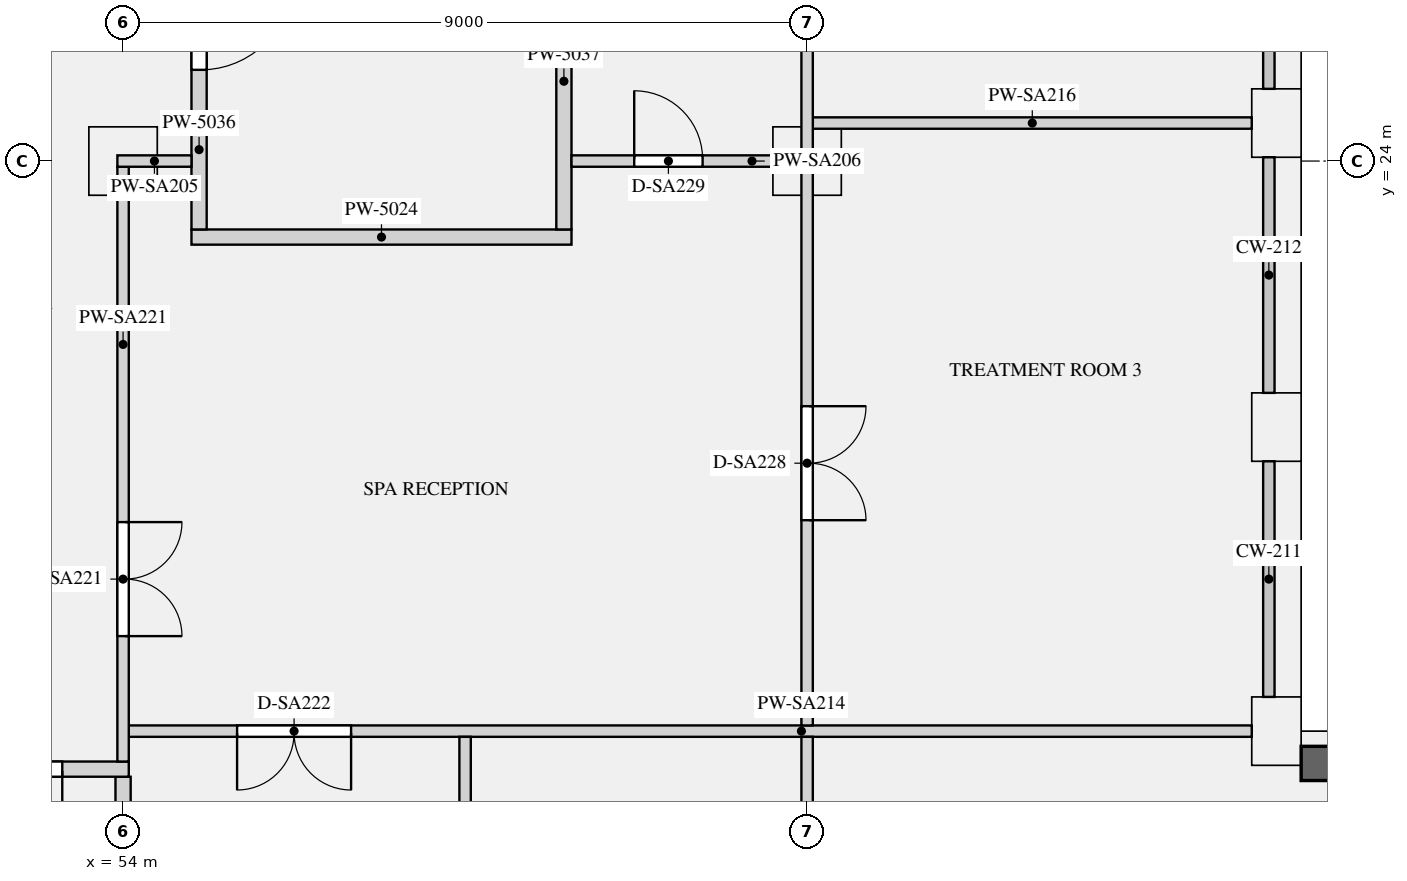
"""IFC4 building model, lengths in metres.
Left out: names, types, materials, properties, quantities, classifications, styles, units other than length and angle.
Written with IfcOpenShell. Run it as: python <this file> out.ifc"""

import sys

from ifc_helpers import new_model, si_unit, direction, frame, frame_2d, origin, origin_2d, place, context, subcontext, project, spatial, rectangle, extrude, element, fill, save


model = new_model("IFC4")
c1 = context("Model", 3, precision=1e-05, world=origin(), true_north=direction((0.0, 1.0)))
c2 = subcontext(c1, "Body", "Model", "MODEL_VIEW")
j1 = project(units=[si_unit("LENGTHUNIT", "METRE"), si_unit("PLANEANGLEUNIT", "RADIAN")], contexts=[c1])
p1 = place(None, origin())
s1 = spatial("IfcSite", under=j1, at=p1, CompositionType="ELEMENT")
p2 = place(p1, origin())
s2 = spatial("IfcBuilding", under=s1, at=p2, CompositionType="ELEMENT")
p3 = place(p2, frame((0.0, 0.0, 191.7)))
s3 = spatial("IfcBuildingStorey", under=s2, at=p3, CompositionType="ELEMENT", Elevation=191.7)
for number, where, z_axis, x_axis in (
    (1, (69.175, 16.5, 0.0), (0.0, 0.0, 1.0), (0.0, 1.0, 0.0)),
    (2, (69.175, 20.5, 0.0), (0.0, 0.0, 1.0), (0.0, 1.0, 0.0)),
    (3, (69.175, 24.5, 0.0), (0.0, 0.0, 1.0), (0.0, 1.0, 0.0)),
):
    element("IfcColumn", number, at=place(p3, frame(where, z_axis=z_axis, x_axis=x_axis)), inside=s3, PredefinedType="USERDEFINED", context=c2, shape_type="SweptSolid", body=[
        extrude(rectangle(XDim=0.9, YDim=0.65, at=origin_2d()), origin(), (0.0, 0.0, 1.0), 6.3),
    ])
for number, where, z_axis, x_axis in (
    (4, (54.0, 24.0, 0.0), (0.0, 0.0, 1.0), (1.0, 0.0, 0.0)),
    (5, (63.0, 24.0, 0.0), (0.0, 0.0, 1.0), (1.0, 0.0, 0.0)),
):
    element("IfcColumn", number, at=place(p3, frame(where, z_axis=z_axis, x_axis=x_axis)), inside=s3, PredefinedType="COLUMN", context=c2, shape_type="SweptSolid", body=[
        extrude(rectangle(XDim=0.9, YDim=0.9, at=origin_2d()), origin(), (0.0, 0.0, 1.0), 6.3),
    ])
p4 = place(p3, frame((71.1, 16.075, 0.9), z_axis=(0.0, 0.0, 1.0), x_axis=(-1.0, 0.0, 0.0)))
e6 = element("IfcWall", 6, at=p4, inside=s3, PredefinedType="SOLIDWALL", context=c2, shape_type="SweptSolid", body=[
    extrude(rectangle(XDim=1.6, YDim=0.45, at=frame_2d((0.8, 0.0))), origin(), (0.0, 0.0, 1.0), 5.08),
])
p5 = place(p3, frame((54.9, 23.0, 0.0), z_axis=(0.0, 0.0, 1.0), x_axis=(1.0, 0.0, 0.0)))
e7 = element("IfcWall", 7, at=p5, inside=s3, PredefinedType="PARTITIONING", context=c2, shape_type="SweptSolid", body=[
    extrude(rectangle(XDim=5.0, YDim=0.2, at=frame_2d((2.5, 0.0))), origin(), (0.0, 0.0, 1.0), 5.98),
])
p6 = place(p3, frame((54.0, 12.5, 0.0), z_axis=(0.0, 0.0, 1.0), x_axis=(0.0, 1.0, 0.0)))
e8 = element("IfcWall", 8, at=p6, inside=s3, PredefinedType="PARTITIONING", context=c2, shape_type="SweptSolid", body=[
    extrude(rectangle(XDim=3.4, YDim=0.2, at=frame_2d((1.7, 0.0))), origin(), (0.0, 0.0, 1.0), 5.98),
])
p7 = place(p3, frame((55.0, 23.1, 0.0), z_axis=(0.0, 0.0, 1.0), x_axis=(0.0, 1.0, 0.0)))
e9 = element("IfcWall", 9, at=p7, inside=s3, PredefinedType="PARTITIONING", context=c2, shape_type="SweptSolid", body=[
    extrude(rectangle(XDim=3.8, YDim=0.2, at=frame_2d((1.9, 0.0))), origin(), (0.0, 0.0, 1.0), 5.98),
])
p8 = place(p7, frame((2.1, 0.0, 0.0)))
e10 = element("IfcOpeningElement", 10, at=p8, cuts=e9, PredefinedType="OPENING", context=c2, shape_type="SweptSolid", body=[
    extrude(rectangle(XDim=1.2, YDim=2.1, at=frame_2d((0.6, 1.05))), frame((0.0, 0.11, 0.0), z_axis=(0.0, -1.0, 0.0), x_axis=(1.0, 0.0, 0.0)), (0.0, 0.0, 1.0), 0.22),
])
p9 = place(p3, frame((59.8, 23.1, 0.0), z_axis=(0.0, 0.0, 1.0), x_axis=(0.0, 1.0, 0.0)))
e11 = element("IfcWall", 11, at=p9, inside=s3, PredefinedType="PARTITIONING", context=c2, shape_type="SweptSolid", body=[
    extrude(rectangle(XDim=3.9, YDim=0.2, at=frame_2d((1.95, 0.0))), origin(), (0.0, 0.0, 1.0), 5.98),
])
p10 = place(p3, frame((53.925, 24.0, 0.0), z_axis=(0.0, 0.0, 1.0), x_axis=(1.0, 0.0, 0.0)))
e12 = element("IfcWall", 12, at=p10, inside=s3, PredefinedType="PARTITIONING", context=c2, shape_type="SweptSolid", body=[
    extrude(rectangle(XDim=0.975, YDim=0.15, at=frame_2d((0.487, 0.0))), origin(), (0.0, 0.0, 1.0), 5.98),
])
p11 = place(p3, frame((59.9, 24.0, 0.0), z_axis=(0.0, 0.0, 1.0), x_axis=(1.0, 0.0, 0.0)))
e13 = element("IfcWall", 13, at=p11, inside=s3, PredefinedType="PARTITIONING", context=c2, shape_type="SweptSolid", body=[
    extrude(rectangle(XDim=3.025, YDim=0.15, at=frame_2d((1.513, 0.0))), origin(), (0.0, 0.0, 1.0), 5.98),
])
p12 = place(p11, frame((0.825, 0.0, 0.0)))
e14 = element("IfcOpeningElement", 14, at=p12, cuts=e13, PredefinedType="OPENING", context=c2, shape_type="SweptSolid", body=[
    extrude(rectangle(XDim=0.9, YDim=2.1, at=frame_2d((0.45, 1.05))), frame((0.0, 0.085, 0.0), z_axis=(0.0, -1.0, 0.0), x_axis=(1.0, 0.0, 0.0)), (0.0, 0.0, 1.0), 0.17),
])
p13 = place(p3, frame((54.075, 16.5, 0.0), z_axis=(0.0, 0.0, 1.0), x_axis=(1.0, 0.0, 0.0)))
e15 = element("IfcWall", 15, at=p13, inside=s3, PredefinedType="PARTITIONING", context=c2, shape_type="SweptSolid", body=[
    extrude(rectangle(XDim=14.775, YDim=0.15, at=frame_2d((7.388, 0.0))), origin(), (0.0, 0.0, 1.0), 5.98),
])
p14 = place(p13, frame((1.425, 0.0, 0.0)))
e16 = element("IfcOpeningElement", 16, at=p14, cuts=e15, PredefinedType="OPENING", context=c2, shape_type="SweptSolid", body=[
    extrude(rectangle(XDim=1.5, YDim=2.1, at=frame_2d((0.75, 1.05))), frame((0.0, 0.085, 0.0), z_axis=(0.0, -1.0, 0.0), x_axis=(1.0, 0.0, 0.0)), (0.0, 0.0, 1.0), 0.17),
])
p15 = place(p3, frame((63.075, 24.5, 0.0), z_axis=(0.0, 0.0, 1.0), x_axis=(1.0, 0.0, 0.0)))
e17 = element("IfcWall", 17, at=p15, inside=s3, PredefinedType="PARTITIONING", context=c2, shape_type="SweptSolid", body=[
    extrude(rectangle(XDim=5.775, YDim=0.15, at=frame_2d((2.888, 0.0))), origin(), (0.0, 0.0, 1.0), 5.98),
])
p16 = place(p3, frame((17.925, 16.0, 0.0), z_axis=(0.0, 0.0, 1.0), x_axis=(1.0, 0.0, 0.0)))
e18 = element("IfcWall", 18, at=p16, inside=s3, PredefinedType="PARTITIONING", context=c2, shape_type="SweptSolid", body=[
    extrude(rectangle(XDim=36.15, YDim=0.2, at=frame_2d((18.075, 0.0))), origin(), (0.0, 0.0, 1.0), 5.98),
])
p17 = place(p16, frame((0.875, 0.0, 0.0)))
e19 = element("IfcOpeningElement", 19, at=p17, cuts=e18, PredefinedType="OPENING", context=c2, shape_type="SweptSolid", body=[
    extrude(rectangle(XDim=1.4, YDim=2.1, at=frame_2d((0.7, 1.05))), frame((0.0, 0.11, 0.0), z_axis=(0.0, -1.0, 0.0), x_axis=(1.0, 0.0, 0.0)), (0.0, 0.0, 1.0), 0.22),
])
p18 = place(p16, frame((33.875, 0.0, 0.0)))
e20 = element("IfcOpeningElement", 20, at=p18, cuts=e18, PredefinedType="OPENING", context=c2, shape_type="SweptSolid", body=[
    extrude(rectangle(XDim=1.4, YDim=2.1, at=frame_2d((0.7, 1.05))), frame((0.0, 0.11, 0.0), z_axis=(0.0, -1.0, 0.0), x_axis=(1.0, 0.0, 0.0)), (0.0, 0.0, 1.0), 0.22),
])
p19 = place(p3, frame((54.0, 16.1, 0.0), z_axis=(0.0, 0.0, 1.0), x_axis=(0.0, 1.0, 0.0)))
e21 = element("IfcWall", 21, at=p19, inside=s3, PredefinedType="PARTITIONING", context=c2, shape_type="SweptSolid", body=[
    extrude(rectangle(XDim=7.825, YDim=0.15, at=frame_2d((3.913, 0.0))), origin(), (0.0, 0.0, 1.0), 5.98),
])
p20 = place(p19, frame((1.65, 0.0, 0.0)))
e22 = element("IfcOpeningElement", 22, at=p20, cuts=e21, PredefinedType="OPENING", context=c2, shape_type="SweptSolid", body=[
    extrude(rectangle(XDim=1.5, YDim=2.1, at=frame_2d((0.75, 1.05))), frame((0.0, 0.085, 0.0), z_axis=(0.0, -1.0, 0.0), x_axis=(1.0, 0.0, 0.0)), (0.0, 0.0, 1.0), 0.17),
])
for number, where, z_axis, x_axis in (
    (23, (58.5, 12.575, 0.0), (0.0, 0.0, 1.0), (0.0, 1.0, 0.0)),
    (24, (63.0, 12.575, 0.0), (0.0, 0.0, 1.0), (0.0, 1.0, 0.0)),
):
    element("IfcWall", number, at=place(p3, frame(where, z_axis=z_axis, x_axis=x_axis)), inside=s3, PredefinedType="PARTITIONING", context=c2, shape_type="SweptSolid", body=[
        extrude(rectangle(XDim=3.85, YDim=0.15, at=frame_2d((1.925, 0.0))), origin(), (0.0, 0.0, 1.0), 5.98),
    ])
p21 = place(p3, frame((63.0, 16.575, 0.0), z_axis=(0.0, 0.0, 1.0), x_axis=(0.0, 1.0, 0.0)))
e25 = element("IfcWall", 25, at=p21, inside=s3, PredefinedType="PARTITIONING", context=c2, shape_type="SweptSolid", body=[
    extrude(rectangle(XDim=24.275, YDim=0.15, at=frame_2d((12.138, 0.0))), origin(), (0.0, 0.0, 1.0), 5.98),
])
p22 = place(p21, frame((2.7, 0.0, 0.0)))
e26 = element("IfcOpeningElement", 26, at=p22, cuts=e25, PredefinedType="OPENING", context=c2, shape_type="SweptSolid", body=[
    extrude(rectangle(XDim=1.5, YDim=2.1, at=frame_2d((0.75, 1.05))), frame((0.0, 0.085, 0.0), z_axis=(0.0, -1.0, 0.0), x_axis=(1.0, 0.0, 0.0)), (0.0, 0.0, 1.0), 0.17),
])
p23 = place(p21, frame((9.475, 0.0, 0.0)))
e27 = element("IfcOpeningElement", 27, at=p23, cuts=e25, PredefinedType="OPENING", context=c2, shape_type="SweptSolid", body=[
    extrude(rectangle(XDim=0.9, YDim=2.1, at=frame_2d((0.45, 1.05))), frame((0.0, 0.085, 0.0), z_axis=(0.0, -1.0, 0.0), x_axis=(1.0, 0.0, 0.0)), (0.0, 0.0, 1.0), 0.17),
])
p24 = place(p21, frame((13.6, 0.0, 0.0)))
e28 = element("IfcOpeningElement", 28, at=p24, cuts=e25, PredefinedType="OPENING", context=c2, shape_type="SweptSolid", body=[
    extrude(rectangle(XDim=0.9, YDim=2.1, at=frame_2d((0.45, 1.05))), frame((0.0, 0.085, 0.0), z_axis=(0.0, -1.0, 0.0), x_axis=(1.0, 0.0, 0.0)), (0.0, 0.0, 1.0), 0.17),
])
p25 = place(p21, frame((16.875, 0.0, 0.0)))
e29 = element("IfcOpeningElement", 29, at=p25, cuts=e25, PredefinedType="OPENING", context=c2, shape_type="SweptSolid", body=[
    extrude(rectangle(XDim=0.9, YDim=2.1, at=frame_2d((0.45, 1.05))), frame((0.0, 0.085, 0.0), z_axis=(0.0, -1.0, 0.0), x_axis=(1.0, 0.0, 0.0)), (0.0, 0.0, 1.0), 0.17),
])
p26 = place(p8, frame((1.2, 0.0, 0.0), z_axis=(0.0, 0.0, 1.0), x_axis=(-1.0, 0.0, 0.0)))
e30 = element("IfcDoor", 30, at=p26, inside=s3, OperationType="SINGLE_SWING_LEFT", PredefinedType="DOOR", context=c2, shape_type="SweptSolid", body=[
    extrude(rectangle(XDim=1.2, YDim=2.1, at=frame_2d((0.6, 1.05))), frame((0.0, 0.025, 0.0), z_axis=(0.0, -1.0, 0.0), x_axis=(1.0, 0.0, 0.0)), (0.0, 0.0, 1.0), 0.05),
])
fill(e10, e30)
p27 = place(p18, frame((1.4, 0.0, 0.0), z_axis=(0.0, 0.0, 1.0), x_axis=(-1.0, 0.0, 0.0)))
e31 = element("IfcDoor", 31, at=p27, inside=s3, OperationType="DOUBLE_DOOR_SINGLE_SWING", PredefinedType="DOOR", context=c2, shape_type="SweptSolid", body=[
    extrude(rectangle(XDim=1.4, YDim=2.1, at=frame_2d((0.7, 1.05))), frame((0.0, 0.025, 0.0), z_axis=(0.0, -1.0, 0.0), x_axis=(1.0, 0.0, 0.0)), (0.0, 0.0, 1.0), 0.05),
])
fill(e20, e31)
p28 = place(p20, frame((1.5, 0.0, 0.0), z_axis=(0.0, 0.0, 1.0), x_axis=(-1.0, 0.0, 0.0)))
e32 = element("IfcDoor", 32, at=p28, inside=s3, OperationType="DOUBLE_DOOR_SINGLE_SWING", PredefinedType="DOOR", context=c2, shape_type="SweptSolid", body=[
    extrude(rectangle(XDim=1.5, YDim=2.1, at=frame_2d((0.75, 1.05))), frame((0.0, 0.025, 0.0), z_axis=(0.0, -1.0, 0.0), x_axis=(1.0, 0.0, 0.0)), (0.0, 0.0, 1.0), 0.05),
])
fill(e22, e32)
p29 = place(p14, frame((1.5, 0.0, 0.0), z_axis=(0.0, 0.0, 1.0), x_axis=(-1.0, 0.0, 0.0)))
e33 = element("IfcDoor", 33, at=p29, inside=s3, OperationType="DOUBLE_DOOR_SINGLE_SWING", PredefinedType="DOOR", context=c2, shape_type="SweptSolid", body=[
    extrude(rectangle(XDim=1.5, YDim=2.1, at=frame_2d((0.75, 1.05))), frame((0.0, 0.025, 0.0), z_axis=(0.0, -1.0, 0.0), x_axis=(1.0, 0.0, 0.0)), (0.0, 0.0, 1.0), 0.05),
])
fill(e16, e33)
p30 = place(p22, frame((1.5, 0.0, 0.0), z_axis=(0.0, 0.0, 1.0), x_axis=(-1.0, 0.0, 0.0)))
e34 = element("IfcDoor", 34, at=p30, inside=s3, OperationType="DOUBLE_DOOR_SINGLE_SWING", PredefinedType="DOOR", context=c2, shape_type="SweptSolid", body=[
    extrude(rectangle(XDim=1.5, YDim=2.1, at=frame_2d((0.75, 1.05))), frame((0.0, 0.025, 0.0), z_axis=(0.0, -1.0, 0.0), x_axis=(1.0, 0.0, 0.0)), (0.0, 0.0, 1.0), 0.05),
])
fill(e26, e34)
p31 = place(p12, origin())
e35 = element("IfcDoor", 35, at=p31, inside=s3, OperationType="SINGLE_SWING_LEFT", PredefinedType="DOOR", context=c2, shape_type="SweptSolid", body=[
    extrude(rectangle(XDim=0.9, YDim=2.1, at=frame_2d((0.45, 1.05))), frame((0.0, 0.025, 0.0), z_axis=(0.0, -1.0, 0.0), x_axis=(1.0, 0.0, 0.0)), (0.0, 0.0, 1.0), 0.05),
])
fill(e14, e35)
save(model, sys.argv[1])
